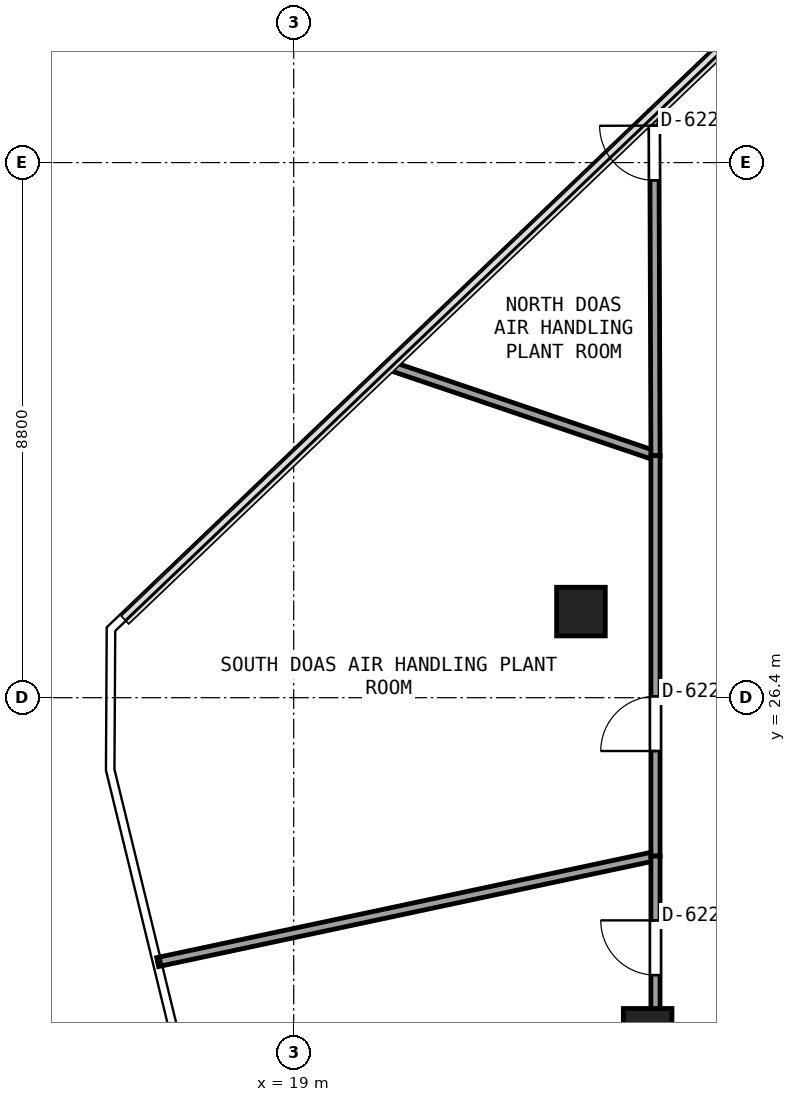
"""IFC4 building model, lengths in metres.
Left out: names, types, materials, properties, quantities, classifications, styles, units other than length and angle.
Written with IfcOpenShell. Run it as: python <this file> out.ifc"""

import sys

from ifc_helpers import new_model, si_unit, direction, frame, frame_2d, origin, origin_2d, place, context, subcontext, project, spatial, rectangle, extrude, element, fill, save


model = new_model("IFC4")
c1 = context("Model", 3, precision=1e-05, world=origin(), true_north=direction((0.0, 1.0)))
c2 = subcontext(c1, "Body", "Model", "MODEL_VIEW")
j1 = project(units=[si_unit("LENGTHUNIT", "METRE"), si_unit("PLANEANGLEUNIT", "RADIAN")], contexts=[c1])
p1 = place(None, origin())
s1 = spatial("IfcSite", under=j1, at=p1, CompositionType="ELEMENT")
p2 = place(p1, origin())
s2 = spatial("IfcBuilding", under=s1, at=p2, CompositionType="ELEMENT")
p3 = place(p2, frame((0.0, 0.0, 231.9)))
s3 = spatial("IfcBuildingStorey", under=s2, at=p3, CompositionType="ELEMENT", Elevation=231.9)
for number, where, z_axis, x_axis in (
    (1, (23.724, 27.816, 0.0), (0.0, 0.0, 1.0), (1.0, 0.0, 0.0)),
    (2, (24.821, 20.889, 0.0), (0.0, 0.0, 1.0), (1.0, 0.0, 0.0)),
):
    element("IfcColumn", number, at=place(p3, frame(where, z_axis=z_axis, x_axis=x_axis)), inside=s3, PredefinedType="COLUMN", context=c2, shape_type="SweptSolid", body=[
        extrude(rectangle(XDim=0.8, YDim=0.8, at=origin_2d()), origin(), (0.0, 0.0, 1.0), 3.18),
    ])
p4 = place(p3, frame((20.544, 31.872, 0.0), z_axis=(0.0, 0.0, 1.0), x_axis=(0.947155635017, -0.320774380297, 0.0)))
e3 = element("IfcWall", 3, at=p4, inside=s3, PredefinedType="PARTITIONING", context=c2, shape_type="SweptSolid", body=[
    extrude(rectangle(XDim=4.652, YDim=0.15, at=frame_2d((2.326, 0.0))), origin(), (0.0, 0.0, 1.0), 3.18),
])
p5 = place(p3, frame((24.95, 30.38, 0.0), z_axis=(0.0, 0.0, 1.0), x_axis=(-0.003531872704, 0.999993762918, 0.0)))
e4 = element("IfcWall", 4, at=p5, inside=s3, PredefinedType="PARTITIONING", context=c2, shape_type="SweptSolid", body=[
    extrude(rectangle(XDim=5.668, YDim=0.15, at=frame_2d((2.834, 0.0))), origin(), (0.0, 0.0, 1.0), 3.18),
])
p6 = place(p5, frame((4.528, 0.0, 0.0)))
e5 = element("IfcOpeningElement", 5, at=p6, cuts=e4, PredefinedType="OPENING", context=c2, shape_type="SweptSolid", body=[
    extrude(rectangle(XDim=0.9, YDim=2.0, at=frame_2d((0.45, 1.0))), frame((0.0, 0.085, 0.0), z_axis=(0.0, -1.0, 0.0), x_axis=(1.0, 0.0, 0.0)), (0.0, 0.0, 1.0), 0.17),
])
p7 = place(p3, frame((16.762, 22.052, 0.0), z_axis=(0.0, 0.0, 1.0), x_axis=(0.978062839509, 0.208310062097, 0.0)))
e6 = element("IfcWall", 6, at=p7, inside=s3, PredefinedType="PARTITIONING", context=c2, shape_type="SweptSolid", body=[
    extrude(rectangle(XDim=8.372, YDim=0.15, at=frame_2d((4.186, 0.0))), origin(), (0.0, 0.0, 1.0), 2.705),
])
p8 = place(p3, frame((24.95, 23.796, 0.0), z_axis=(0.0, 0.0, 1.0), x_axis=(0.0, 1.0, 0.0)))
e7 = element("IfcWall", 7, at=p8, inside=s3, PredefinedType="PARTITIONING", context=c2, shape_type="SweptSolid", body=[
    extrude(rectangle(XDim=6.584, YDim=0.15, at=frame_2d((3.292, 0.0))), origin(), (0.0, 0.0, 1.0), 2.625),
])
p9 = place(p8, frame((1.727, 0.0, 0.0)))
e8 = element("IfcOpeningElement", 8, at=p9, cuts=e7, PredefinedType="OPENING", context=c2, shape_type="SweptSolid", body=[
    extrude(rectangle(XDim=0.9, YDim=2.0, at=frame_2d((0.45, 1.0))), frame((0.0, 0.085, 0.0), z_axis=(0.0, -1.0, 0.0), x_axis=(1.0, 0.0, 0.0)), (0.0, 0.0, 1.0), 0.17),
])
p10 = place(p3, frame((24.95, 18.6, 0.0), z_axis=(0.0, 0.0, 1.0), x_axis=(0.0, 1.0, 0.0)))
e9 = element("IfcWall", 9, at=p10, inside=s3, PredefinedType="PARTITIONING", context=c2, shape_type="SweptSolid", body=[
    extrude(rectangle(XDim=5.196, YDim=0.15, at=frame_2d((2.598, 0.0))), origin(), (0.0, 0.0, 1.0), 2.853),
])
p11 = place(p10, frame((3.238, 0.0, 0.0)))
e10 = element("IfcOpeningElement", 10, at=p11, cuts=e9, PredefinedType="OPENING", context=c2, shape_type="SweptSolid", body=[
    extrude(rectangle(XDim=0.9, YDim=2.0, at=frame_2d((0.45, 1.0))), frame((0.0, 0.085, 0.0), z_axis=(0.0, -1.0, 0.0), x_axis=(1.0, 0.0, 0.0)), (0.0, 0.0, 1.0), 0.17),
])
p12 = place(p6, origin())
e11 = element("IfcDoor", 11, at=p12, inside=s3, OperationType="SINGLE_SWING_RIGHT", PredefinedType="DOOR", context=c2, shape_type="SweptSolid", body=[
    extrude(rectangle(XDim=0.9, YDim=2.0, at=frame_2d((0.45, 1.0))), frame((0.0, 0.025, 0.0), z_axis=(0.0, -1.0, 0.0), x_axis=(1.0, 0.0, 0.0)), (0.0, 0.0, 1.0), 0.05),
])
fill(e5, e11)
p13 = place(p9, origin())
e12 = element("IfcDoor", 12, at=p13, inside=s3, OperationType="SINGLE_SWING_LEFT", PredefinedType="DOOR", context=c2, shape_type="SweptSolid", body=[
    extrude(rectangle(XDim=0.9, YDim=2.0, at=frame_2d((0.45, 1.0))), frame((0.0, 0.025, 0.0), z_axis=(0.0, -1.0, 0.0), x_axis=(1.0, 0.0, 0.0)), (0.0, 0.0, 1.0), 0.05),
])
fill(e8, e12)
p14 = place(p11, origin())
e13 = element("IfcDoor", 13, at=p14, inside=s3, OperationType="SINGLE_SWING_RIGHT", PredefinedType="DOOR", context=c2, shape_type="SweptSolid", body=[
    extrude(rectangle(XDim=0.9, YDim=2.0, at=frame_2d((0.45, 1.0))), frame((0.0, 0.025, 0.0), z_axis=(0.0, -1.0, 0.0), x_axis=(1.0, 0.0, 0.0)), (0.0, 0.0, 1.0), 0.05),
])
fill(e10, e13)
save(model, sys.argv[1])
